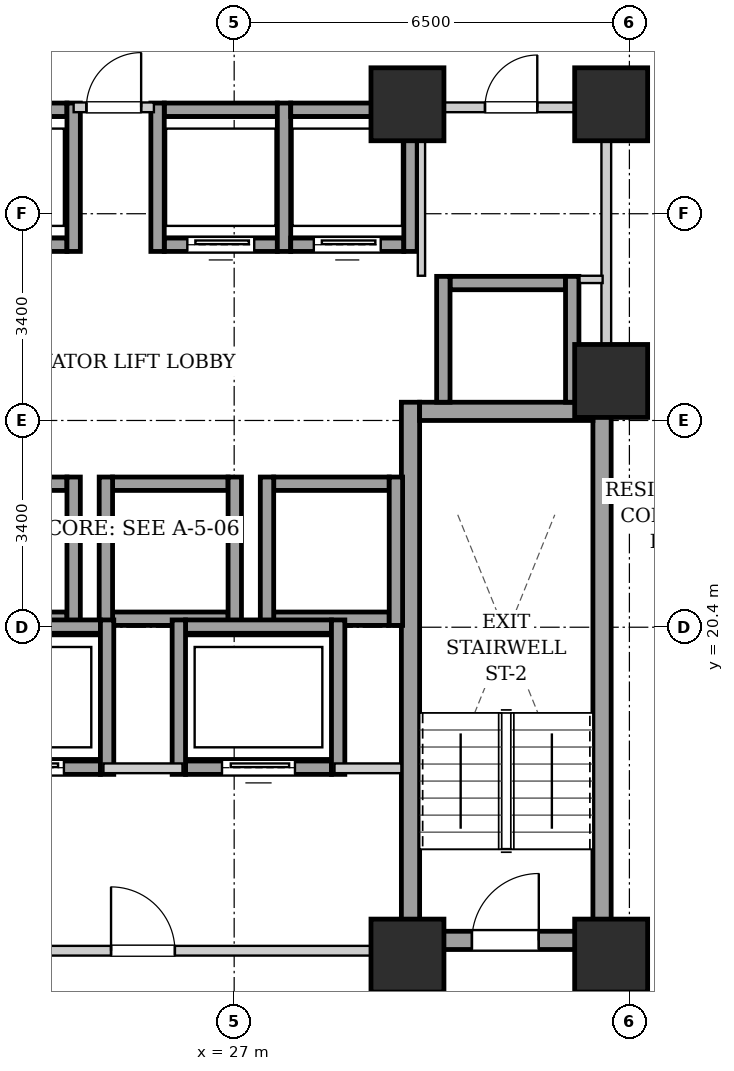
"""IFC4 building model, lengths in metres.
Left out: names, types, materials, properties, quantities, classifications, styles, units other than length and angle.
Written with IfcOpenShell. Run it as: python <this file> out.ifc"""

import sys

from ifc_helpers import new_model, si_unit, direction, frame, frame_2d, origin, origin_2d, place, context, subcontext, project, spatial, rectangle, extrude, element, fill, save


model = new_model("IFC4")
c1 = context("Model", 3, precision=1e-05, world=origin(), true_north=direction((0.0, 1.0)))
c2 = subcontext(c1, "Body", "Model", "MODEL_VIEW")
j1 = project(units=[si_unit("LENGTHUNIT", "METRE"), si_unit("PLANEANGLEUNIT", "RADIAN")], contexts=[c1])
p1 = place(None, origin())
s1 = spatial("IfcSite", under=j1, at=p1, CompositionType="ELEMENT")
p2 = place(p1, origin())
s2 = spatial("IfcBuilding", under=s1, at=p2, CompositionType="ELEMENT")
p3 = place(p2, frame((0.0, 0.0, 67.4)))
s3 = spatial("IfcBuildingStorey", under=s2, at=p3, CompositionType="ELEMENT", Elevation=67.4)
for number, where, z_axis, x_axis in (
    (1, (29.85, 15.0, 0.0), (0.0, 0.0, 1.0), (1.0, 0.0, 0.0)),
    (2, (33.2, 15.0, 0.0), (0.0, 0.0, 1.0), (1.0, 0.0, 0.0)),
    (3, (29.85, 29.0, 0.0), (0.0, 0.0, 1.0), (1.0, 0.0, 0.0)),
    (4, (33.2, 29.0, 0.0), (0.0, 0.0, 1.0), (1.0, 0.0, 0.0)),
    (5, (33.2, 24.45, 0.0), (0.0, 0.0, 1.0), (1.0, 0.0, 0.0)),
):
    element("IfcColumn", number, at=place(p3, frame(where, z_axis=z_axis, x_axis=x_axis)), inside=s3, PredefinedType="COLUMN", context=c2, shape_type="SweptSolid", body=[
        extrude(rectangle(XDim=1.2, YDim=1.2, at=origin_2d()), origin(), (0.0, 0.0, 1.0), 3.2),
    ])
for number, where, z_axis, x_axis in (
    (6, (29.9, 15.1, 0.0), (0.0, 0.0, 1.0), (0.0, 1.0, 0.0)),
    (7, (33.05, 15.1, 0.0), (0.0, 0.0, 1.0), (0.0, 1.0, 0.0)),
):
    element("IfcWall", number, at=place(p3, frame(where, z_axis=z_axis, x_axis=x_axis)), inside=s3, PredefinedType="SHEAR", context=c2, shape_type="SweptSolid", body=[
        extrude(rectangle(XDim=9.0, YDim=0.3, at=frame_2d((4.5, 0.0))), origin(), (0.0, 0.0, 1.0), 2.88),
    ])
p4 = place(p3, frame((30.05, 23.95, 0.0), z_axis=(0.0, 0.0, 1.0), x_axis=(1.0, 0.0, 0.0)))
e8 = element("IfcWall", 8, at=p4, inside=s3, PredefinedType="SHEAR", context=c2, shape_type="SweptSolid", body=[
    extrude(rectangle(XDim=2.85, YDim=0.3, at=frame_2d((1.425, 0.0))), origin(), (0.0, 0.0, 1.0), 2.88),
])
p5 = place(p3, frame((30.05, 15.25, 0.0), z_axis=(0.0, 0.0, 1.0), x_axis=(1.0, 0.0, 0.0)))
e9 = element("IfcWall", 9, at=p5, inside=s3, PredefinedType="SHEAR", context=c2, shape_type="SweptSolid", body=[
    extrude(rectangle(XDim=2.85, YDim=0.3, at=frame_2d((1.425, 0.0))), origin(), (0.0, 0.0, 1.0), 2.88),
])
p6 = place(p5, frame((0.86, 0.0, 0.0)))
e10 = element("IfcOpeningElement", 10, at=p6, cuts=e9, PredefinedType="OPENING", context=c2, shape_type="SweptSolid", body=[
    extrude(rectangle(XDim=1.1, YDim=2.05, at=frame_2d((0.55, 1.025))), frame((0.0, 0.16, 0.0), z_axis=(0.0, -1.0, 0.0), x_axis=(1.0, 0.0, 0.0)), (0.0, 0.0, 1.0), 0.32),
])
p7 = place(p3, frame((22.35, 26.69, 0.0), z_axis=(0.0, 0.0, 1.0), x_axis=(1.0, 0.0, 0.0)))
e11 = element("IfcWall", 11, at=p7, inside=s3, PredefinedType="SHEAR", context=c2, shape_type="SweptSolid", body=[
    extrude(rectangle(XDim=1.9, YDim=0.22, at=frame_2d((0.95, 0.0))), origin(), (0.0, 0.0, 1.0), 2.88),
])
p8 = place(p7, frame((0.4, 0.0, 0.0)))
e12 = element("IfcOpeningElement", 12, at=p8, cuts=e11, PredefinedType="OPENING", context=c2, shape_type="SweptSolid", body=[
    extrude(rectangle(XDim=1.1, YDim=2.15, at=frame_2d((0.55, 1.075))), frame((0.0, 0.12, 0.0), z_axis=(0.0, -1.0, 0.0), x_axis=(1.0, 0.0, 0.0)), (0.0, 0.0, 1.0), 0.24),
])
p9 = place(p3, frame((22.35, 28.91, 0.0), z_axis=(0.0, 0.0, 1.0), x_axis=(1.0, 0.0, 0.0)))
e13 = element("IfcWall", 13, at=p9, inside=s3, PredefinedType="SHEAR", context=c2, shape_type="SweptSolid", body=[
    extrude(rectangle(XDim=1.9, YDim=0.22, at=frame_2d((0.95, 0.0))), origin(), (0.0, 0.0, 1.0), 2.88),
])
p10 = place(p3, frame((24.36, 26.58, 0.0), z_axis=(0.0, 0.0, 1.0), x_axis=(0.0, 1.0, 0.0)))
e14 = element("IfcWall", 14, at=p10, inside=s3, PredefinedType="SHEAR", context=c2, shape_type="SweptSolid", body=[
    extrude(rectangle(XDim=2.44, YDim=0.22, at=frame_2d((1.22, 0.0))), origin(), (0.0, 0.0, 1.0), 2.88),
])
p11 = place(p3, frame((25.85, 26.69, 0.0), z_axis=(0.0, 0.0, 1.0), x_axis=(1.0, 0.0, 0.0)))
e15 = element("IfcWall", 15, at=p11, inside=s3, PredefinedType="SHEAR", context=c2, shape_type="SweptSolid", body=[
    extrude(rectangle(XDim=1.86, YDim=0.22, at=frame_2d((0.93, 0.0))), origin(), (0.0, 0.0, 1.0), 2.88),
])
p12 = place(p11, frame((0.38, 0.0, 0.0)))
e16 = element("IfcOpeningElement", 16, at=p12, cuts=e15, PredefinedType="OPENING", context=c2, shape_type="SweptSolid", body=[
    extrude(rectangle(XDim=1.1, YDim=2.15, at=frame_2d((0.55, 1.075))), frame((0.0, 0.12, 0.0), z_axis=(0.0, -1.0, 0.0), x_axis=(1.0, 0.0, 0.0)), (0.0, 0.0, 1.0), 0.24),
])
p13 = place(p3, frame((25.85, 28.91, 0.0), z_axis=(0.0, 0.0, 1.0), x_axis=(1.0, 0.0, 0.0)))
e17 = element("IfcWall", 17, at=p13, inside=s3, PredefinedType="SHEAR", context=c2, shape_type="SweptSolid", body=[
    extrude(rectangle(XDim=1.86, YDim=0.22, at=frame_2d((0.93, 0.0))), origin(), (0.0, 0.0, 1.0), 2.88),
])
for number, where, z_axis, x_axis in (
    (18, (25.74, 26.58, 0.0), (0.0, 0.0, 1.0), (0.0, 1.0, 0.0)),
    (19, (27.82, 26.58, 0.0), (0.0, 0.0, 1.0), (0.0, 1.0, 0.0)),
):
    element("IfcWall", number, at=place(p3, frame(where, z_axis=z_axis, x_axis=x_axis)), inside=s3, PredefinedType="SHEAR", context=c2, shape_type="SweptSolid", body=[
        extrude(rectangle(XDim=2.44, YDim=0.22, at=frame_2d((1.22, 0.0))), origin(), (0.0, 0.0, 1.0), 2.88),
    ])
p14 = place(p3, frame((27.93, 26.69, 0.0), z_axis=(0.0, 0.0, 1.0), x_axis=(1.0, 0.0, 0.0)))
e20 = element("IfcWall", 20, at=p14, inside=s3, PredefinedType="SHEAR", context=c2, shape_type="SweptSolid", body=[
    extrude(rectangle(XDim=1.86, YDim=0.22, at=frame_2d((0.93, 0.0))), origin(), (0.0, 0.0, 1.0), 2.88),
])
p15 = place(p14, frame((0.38, 0.0, 0.0)))
e21 = element("IfcOpeningElement", 21, at=p15, cuts=e20, PredefinedType="OPENING", context=c2, shape_type="SweptSolid", body=[
    extrude(rectangle(XDim=1.1, YDim=2.15, at=frame_2d((0.55, 1.075))), frame((0.0, 0.12, 0.0), z_axis=(0.0, -1.0, 0.0), x_axis=(1.0, 0.0, 0.0)), (0.0, 0.0, 1.0), 0.24),
])
p16 = place(p3, frame((27.93, 28.91, 0.0), z_axis=(0.0, 0.0, 1.0), x_axis=(1.0, 0.0, 0.0)))
e22 = element("IfcWall", 22, at=p16, inside=s3, PredefinedType="SHEAR", context=c2, shape_type="SweptSolid", body=[
    extrude(rectangle(XDim=1.86, YDim=0.22, at=frame_2d((0.93, 0.0))), origin(), (0.0, 0.0, 1.0), 2.88),
])
p17 = place(p3, frame((29.9, 26.58, 0.0), z_axis=(0.0, 0.0, 1.0), x_axis=(0.0, 1.0, 0.0)))
e23 = element("IfcWall", 23, at=p17, inside=s3, PredefinedType="SHEAR", context=c2, shape_type="SweptSolid", body=[
    extrude(rectangle(XDim=2.44, YDim=0.22, at=frame_2d((1.22, 0.0))), origin(), (0.0, 0.0, 1.0), 2.88),
])
for number, where, z_axis, x_axis in (
    (24, (22.35, 20.54, 0.0), (0.0, 0.0, 1.0), (1.0, 0.0, 0.0)),
    (25, (22.35, 22.76, 0.0), (0.0, 0.0, 1.0), (1.0, 0.0, 0.0)),
):
    element("IfcWall", number, at=place(p3, frame(where, z_axis=z_axis, x_axis=x_axis)), inside=s3, PredefinedType="SHEAR", context=c2, shape_type="SweptSolid", body=[
        extrude(rectangle(XDim=1.9, YDim=0.22, at=frame_2d((0.95, 0.0))), origin(), (0.0, 0.0, 1.0), 2.88),
    ])
p18 = place(p3, frame((24.36, 20.43, 0.0), z_axis=(0.0, 0.0, 1.0), x_axis=(0.0, 1.0, 0.0)))
e26 = element("IfcWall", 26, at=p18, inside=s3, PredefinedType="SHEAR", context=c2, shape_type="SweptSolid", body=[
    extrude(rectangle(XDim=2.44, YDim=0.22, at=frame_2d((1.22, 0.0))), origin(), (0.0, 0.0, 1.0), 2.88),
])
for number, where, z_axis, x_axis in (
    (27, (25.0, 20.54, 0.0), (0.0, 0.0, 1.0), (1.0, 0.0, 0.0)),
    (28, (25.0, 22.76, 0.0), (0.0, 0.0, 1.0), (1.0, 0.0, 0.0)),
):
    element("IfcWall", number, at=place(p3, frame(where, z_axis=z_axis, x_axis=x_axis)), inside=s3, PredefinedType="SHEAR", context=c2, shape_type="SweptSolid", body=[
        extrude(rectangle(XDim=1.9, YDim=0.22, at=frame_2d((0.95, 0.0))), origin(), (0.0, 0.0, 1.0), 2.88),
    ])
for number, where, z_axis, x_axis in (
    (29, (24.89, 20.43, 0.0), (0.0, 0.0, 1.0), (0.0, 1.0, 0.0)),
    (30, (27.01, 20.43, 0.0), (0.0, 0.0, 1.0), (0.0, 1.0, 0.0)),
):
    element("IfcWall", number, at=place(p3, frame(where, z_axis=z_axis, x_axis=x_axis)), inside=s3, PredefinedType="SHEAR", context=c2, shape_type="SweptSolid", body=[
        extrude(rectangle(XDim=2.44, YDim=0.22, at=frame_2d((1.22, 0.0))), origin(), (0.0, 0.0, 1.0), 2.88),
    ])
for number, where, z_axis, x_axis in (
    (31, (27.65, 20.54, 0.0), (0.0, 0.0, 1.0), (1.0, 0.0, 0.0)),
    (32, (27.65, 22.76, 0.0), (0.0, 0.0, 1.0), (1.0, 0.0, 0.0)),
):
    element("IfcWall", number, at=place(p3, frame(where, z_axis=z_axis, x_axis=x_axis)), inside=s3, PredefinedType="SHEAR", context=c2, shape_type="SweptSolid", body=[
        extrude(rectangle(XDim=1.9, YDim=0.22, at=frame_2d((0.95, 0.0))), origin(), (0.0, 0.0, 1.0), 2.88),
    ])
for number, where, z_axis, x_axis in (
    (33, (27.54, 20.43, 0.0), (0.0, 0.0, 1.0), (0.0, 1.0, 0.0)),
    (34, (29.66, 20.43, 0.0), (0.0, 0.0, 1.0), (0.0, 1.0, 0.0)),
):
    element("IfcWall", number, at=place(p3, frame(where, z_axis=z_axis, x_axis=x_axis)), inside=s3, PredefinedType="SHEAR", context=c2, shape_type="SweptSolid", body=[
        extrude(rectangle(XDim=2.44, YDim=0.22, at=frame_2d((1.22, 0.0))), origin(), (0.0, 0.0, 1.0), 2.88),
    ])
p19 = place(p3, frame((30.55, 26.06, 0.0), z_axis=(0.0, 0.0, 1.0), x_axis=(1.0, 0.0, 0.0)))
e35 = element("IfcWall", 35, at=p19, inside=s3, PredefinedType="SHEAR", context=c2, shape_type="SweptSolid", body=[
    extrude(rectangle(XDim=1.9, YDim=0.22, at=frame_2d((0.95, 0.0))), origin(), (0.0, 0.0, 1.0), 2.88),
])
for number, where, z_axis, x_axis in (
    (36, (30.44, 24.1, 0.0), (0.0, 0.0, 1.0), (0.0, 1.0, 0.0)),
    (37, (32.56, 24.1, 0.0), (0.0, 0.0, 1.0), (0.0, 1.0, 0.0)),
):
    element("IfcWall", number, at=place(p3, frame(where, z_axis=z_axis, x_axis=x_axis)), inside=s3, PredefinedType="SHEAR", context=c2, shape_type="SweptSolid", body=[
        extrude(rectangle(XDim=2.07, YDim=0.22, at=frame_2d((1.035, 0.0))), origin(), (0.0, 0.0, 1.0), 2.88),
    ])
p20 = place(p3, frame((22.4, 18.09, 0.0), z_axis=(0.0, 0.0, 1.0), x_axis=(1.0, 0.0, 0.0)))
e38 = element("IfcWall", 38, at=p20, inside=s3, PredefinedType="SHEAR", context=c2, shape_type="SweptSolid", body=[
    extrude(rectangle(XDim=2.4, YDim=0.22, at=frame_2d((1.2, 0.0))), origin(), (0.0, 0.0, 1.0), 2.88),
])
p21 = place(p20, frame((0.6, 0.0, 0.0)))
e39 = element("IfcOpeningElement", 39, at=p21, cuts=e38, PredefinedType="OPENING", context=c2, shape_type="SweptSolid", body=[
    extrude(rectangle(XDim=1.2, YDim=2.15, at=frame_2d((0.6, 1.075))), frame((0.0, 0.12, 0.0), z_axis=(0.0, -1.0, 0.0), x_axis=(1.0, 0.0, 0.0)), (0.0, 0.0, 1.0), 0.24),
])
p22 = place(p3, frame((22.4, 20.41, 0.0), z_axis=(0.0, 0.0, 1.0), x_axis=(1.0, 0.0, 0.0)))
e40 = element("IfcWall", 40, at=p22, inside=s3, PredefinedType="SHEAR", context=c2, shape_type="SweptSolid", body=[
    extrude(rectangle(XDim=2.4, YDim=0.22, at=frame_2d((1.2, 0.0))), origin(), (0.0, 0.0, 1.0), 2.88),
])
p23 = place(p3, frame((24.91, 17.98, 0.0), z_axis=(0.0, 0.0, 1.0), x_axis=(0.0, 1.0, 0.0)))
e41 = element("IfcWall", 41, at=p23, inside=s3, PredefinedType="SHEAR", context=c2, shape_type="SweptSolid", body=[
    extrude(rectangle(XDim=2.54, YDim=0.22, at=frame_2d((1.27, 0.0))), origin(), (0.0, 0.0, 1.0), 2.88),
])
p24 = place(p3, frame((26.2, 18.09, 0.0), z_axis=(0.0, 0.0, 1.0), x_axis=(1.0, 0.0, 0.0)))
e42 = element("IfcWall", 42, at=p24, inside=s3, PredefinedType="SHEAR", context=c2, shape_type="SweptSolid", body=[
    extrude(rectangle(XDim=2.4, YDim=0.22, at=frame_2d((1.2, 0.0))), origin(), (0.0, 0.0, 1.0), 2.88),
])
p25 = place(p24, frame((0.6, 0.0, 0.0)))
e43 = element("IfcOpeningElement", 43, at=p25, cuts=e42, PredefinedType="OPENING", context=c2, shape_type="SweptSolid", body=[
    extrude(rectangle(XDim=1.2, YDim=2.15, at=frame_2d((0.6, 1.075))), frame((0.0, 0.12, 0.0), z_axis=(0.0, -1.0, 0.0), x_axis=(1.0, 0.0, 0.0)), (0.0, 0.0, 1.0), 0.24),
])
p26 = place(p3, frame((26.2, 20.41, 0.0), z_axis=(0.0, 0.0, 1.0), x_axis=(1.0, 0.0, 0.0)))
e44 = element("IfcWall", 44, at=p26, inside=s3, PredefinedType="SHEAR", context=c2, shape_type="SweptSolid", body=[
    extrude(rectangle(XDim=2.4, YDim=0.22, at=frame_2d((1.2, 0.0))), origin(), (0.0, 0.0, 1.0), 2.88),
])
for number, where, z_axis, x_axis in (
    (45, (26.09, 17.98, 0.0), (0.0, 0.0, 1.0), (0.0, 1.0, 0.0)),
    (46, (28.71, 17.98, 0.0), (0.0, 0.0, 1.0), (0.0, 1.0, 0.0)),
):
    element("IfcWall", number, at=place(p3, frame(where, z_axis=z_axis, x_axis=x_axis)), inside=s3, PredefinedType="SHEAR", context=c2, shape_type="SweptSolid", body=[
        extrude(rectangle(XDim=2.54, YDim=0.22, at=frame_2d((1.27, 0.0))), origin(), (0.0, 0.0, 1.0), 2.88),
    ])
p27 = place(p3, frame((21.25, 15.08, 0.0), z_axis=(0.0, 0.0, 1.0), x_axis=(1.0, 0.0, 0.0)))
e47 = element("IfcWall", 47, at=p27, inside=s3, PredefinedType="PARTITIONING", context=c2, shape_type="SweptSolid", body=[
    extrude(rectangle(XDim=8.5, YDim=0.16, at=frame_2d((4.25, 0.0))), origin(), (0.0, 0.0, 1.0), 2.172),
])
p28 = place(p27, frame((3.725, 0.0, 0.0)))
e48 = element("IfcOpeningElement", 48, at=p28, cuts=e47, PredefinedType="OPENING", context=c2, shape_type="SweptSolid", body=[
    extrude(rectangle(XDim=1.05, YDim=2.05, at=frame_2d((0.525, 1.025))), frame((0.0, 0.09, 0.0), z_axis=(0.0, -1.0, 0.0), x_axis=(1.0, 0.0, 0.0)), (0.0, 0.0, 1.0), 0.18),
])
p29 = place(p3, frame((24.85, 18.08, 0.0), z_axis=(0.0, 0.0, 1.0), x_axis=(1.0, 0.0, 0.0)))
e49 = element("IfcWall", 49, at=p29, inside=s3, PredefinedType="PARTITIONING", context=c2, shape_type="SweptSolid", body=[
    extrude(rectangle(XDim=1.3, YDim=0.16, at=frame_2d((0.65, 0.0))), origin(), (0.0, 0.0, 1.0), 2.88),
])
p30 = place(p3, frame((28.65, 18.08, 0.0), z_axis=(0.0, 0.0, 1.0), x_axis=(1.0, 0.0, 0.0)))
e50 = element("IfcWall", 50, at=p30, inside=s3, PredefinedType="PARTITIONING", context=c2, shape_type="SweptSolid", body=[
    extrude(rectangle(XDim=1.1, YDim=0.16, at=frame_2d((0.55, 0.0))), origin(), (0.0, 0.0, 1.0), 2.88),
])
p31 = place(p3, frame((33.12, 24.12, 0.0), z_axis=(0.0, 0.0, 1.0), x_axis=(0.0, 1.0, 0.0)))
e51 = element("IfcWall", 51, at=p31, inside=s3, PredefinedType="PARTITIONING", context=c2, shape_type="SweptSolid", body=[
    extrude(rectangle(XDim=4.76, YDim=0.16, at=frame_2d((2.38, 0.0))), origin(), (0.0, 0.0, 1.0), 2.215),
])
p32 = place(p3, frame((24.36, 28.95, 0.0), z_axis=(0.0, 0.0, 1.0), x_axis=(1.0, 0.0, 0.0)))
e52 = element("IfcWall", 52, at=p32, inside=s3, PredefinedType="PARTITIONING", context=c2, shape_type="SweptSolid", body=[
    extrude(rectangle(XDim=1.32, YDim=0.16, at=frame_2d((0.66, 0.0))), origin(), (0.0, 0.0, 1.0), 2.172),
])
p33 = place(p32, frame((0.21, 0.0, 0.0)))
e53 = element("IfcOpeningElement", 53, at=p33, cuts=e52, PredefinedType="OPENING", context=c2, shape_type="SweptSolid", body=[
    extrude(rectangle(XDim=0.9, YDim=2.05, at=frame_2d((0.45, 1.025))), frame((0.0, 0.09, 0.0), z_axis=(0.0, -1.0, 0.0), x_axis=(1.0, 0.0, 0.0)), (0.0, 0.0, 1.0), 0.18),
])
p34 = place(p3, frame((30.08, 26.18, 0.0), z_axis=(0.0, 0.0, 1.0), x_axis=(0.0, 1.0, 0.0)))
e54 = element("IfcWall", 54, at=p34, inside=s3, PredefinedType="PARTITIONING", context=c2, shape_type="SweptSolid", body=[
    extrude(rectangle(XDim=2.68, YDim=0.12, at=frame_2d((1.34, 0.0))), origin(), (0.0, 0.0, 1.0), 2.88),
])
p35 = place(p3, frame((32.68, 26.12, 0.0), z_axis=(0.0, 0.0, 1.0), x_axis=(1.0, 0.0, 0.0)))
e55 = element("IfcWall", 55, at=p35, inside=s3, PredefinedType="PARTITIONING", context=c2, shape_type="SweptSolid", body=[
    extrude(rectangle(XDim=0.38, YDim=0.12, at=frame_2d((0.19, 0.0))), origin(), (0.0, 0.0, 1.0), 2.88),
])
p36 = place(p3, frame((30.08, 28.95, 0.0), z_axis=(0.0, 0.0, 1.0), x_axis=(1.0, 0.0, 0.0)))
e56 = element("IfcWall", 56, at=p36, inside=s3, PredefinedType="PARTITIONING", context=c2, shape_type="SweptSolid", body=[
    extrude(rectangle(XDim=2.96, YDim=0.16, at=frame_2d((1.48, 0.0))), origin(), (0.0, 0.0, 1.0), 2.88),
])
p37 = place(p36, frame((1.045, 0.0, 0.0)))
e57 = element("IfcOpeningElement", 57, at=p37, cuts=e56, PredefinedType="OPENING", context=c2, shape_type="SweptSolid", body=[
    extrude(rectangle(XDim=0.86, YDim=2.05, at=frame_2d((0.43, 1.025))), frame((0.0, 0.09, 0.0), z_axis=(0.0, -1.0, 0.0), x_axis=(1.0, 0.0, 0.0)), (0.0, 0.0, 1.0), 0.18),
])
p38 = place(p6, origin())
e58 = element("IfcDoor", 58, at=p38, inside=s3, OperationType="SINGLE_SWING_RIGHT", PredefinedType="DOOR", context=c2, shape_type="SweptSolid", body=[
    extrude(rectangle(XDim=1.1, YDim=2.05, at=frame_2d((0.55, 1.025))), frame((0.0, 0.025, 0.0), z_axis=(0.0, -1.0, 0.0), x_axis=(1.0, 0.0, 0.0)), (0.0, 0.0, 1.0), 0.05),
])
fill(e10, e58)
p39 = place(p12, origin())
e59 = element("IfcDoor", 59, at=p39, inside=s3, OperationType="SLIDING_TO_LEFT", PredefinedType="DOOR", context=c2, shape_type="SweptSolid", body=[
    extrude(rectangle(XDim=1.1, YDim=2.15, at=frame_2d((0.55, 1.075))), frame((0.0, 0.025, 0.0), z_axis=(0.0, -1.0, 0.0), x_axis=(1.0, 0.0, 0.0)), (0.0, 0.0, 1.0), 0.05),
])
fill(e16, e59)
p40 = place(p15, origin())
e60 = element("IfcDoor", 60, at=p40, inside=s3, OperationType="SLIDING_TO_LEFT", PredefinedType="DOOR", context=c2, shape_type="SweptSolid", body=[
    extrude(rectangle(XDim=1.1, YDim=2.15, at=frame_2d((0.55, 1.075))), frame((0.0, 0.025, 0.0), z_axis=(0.0, -1.0, 0.0), x_axis=(1.0, 0.0, 0.0)), (0.0, 0.0, 1.0), 0.05),
])
fill(e21, e60)
p41 = place(p21, origin())
e61 = element("IfcDoor", 61, at=p41, inside=s3, OperationType="SLIDING_TO_LEFT", PredefinedType="DOOR", context=c2, shape_type="SweptSolid", body=[
    extrude(rectangle(XDim=1.2, YDim=2.15, at=frame_2d((0.6, 1.075))), frame((0.0, 0.025, 0.0), z_axis=(0.0, -1.0, 0.0), x_axis=(1.0, 0.0, 0.0)), (0.0, 0.0, 1.0), 0.05),
])
fill(e39, e61)
p42 = place(p25, origin())
e62 = element("IfcDoor", 62, at=p42, inside=s3, OperationType="SLIDING_TO_LEFT", PredefinedType="DOOR", context=c2, shape_type="SweptSolid", body=[
    extrude(rectangle(XDim=1.2, YDim=2.15, at=frame_2d((0.6, 1.075))), frame((0.0, 0.025, 0.0), z_axis=(0.0, -1.0, 0.0), x_axis=(1.0, 0.0, 0.0)), (0.0, 0.0, 1.0), 0.05),
])
fill(e43, e62)
p43 = place(p28, origin())
e63 = element("IfcDoor", 63, at=p43, inside=s3, OperationType="SINGLE_SWING_LEFT", PredefinedType="DOOR", context=c2, shape_type="SweptSolid", body=[
    extrude(rectangle(XDim=1.05, YDim=2.05, at=frame_2d((0.525, 1.025))), frame((0.0, 0.025, 0.0), z_axis=(0.0, -1.0, 0.0), x_axis=(1.0, 0.0, 0.0)), (0.0, 0.0, 1.0), 0.05),
])
fill(e48, e63)
p44 = place(p33, origin())
e64 = element("IfcDoor", 64, at=p44, inside=s3, OperationType="SINGLE_SWING_RIGHT", PredefinedType="DOOR", context=c2, shape_type="SweptSolid", body=[
    extrude(rectangle(XDim=0.9, YDim=2.05, at=frame_2d((0.45, 1.025))), frame((0.0, 0.025, 0.0), z_axis=(0.0, -1.0, 0.0), x_axis=(1.0, 0.0, 0.0)), (0.0, 0.0, 1.0), 0.05),
])
fill(e53, e64)
p45 = place(p37, origin())
e65 = element("IfcDoor", 65, at=p45, inside=s3, OperationType="SINGLE_SWING_RIGHT", PredefinedType="DOOR", context=c2, shape_type="SweptSolid", body=[
    extrude(rectangle(XDim=0.86, YDim=2.05, at=frame_2d((0.43, 1.025))), frame((0.0, 0.025, 0.0), z_axis=(0.0, -1.0, 0.0), x_axis=(1.0, 0.0, 0.0)), (0.0, 0.0, 1.0), 0.05),
])
fill(e57, e65)
save(model, sys.argv[1])
